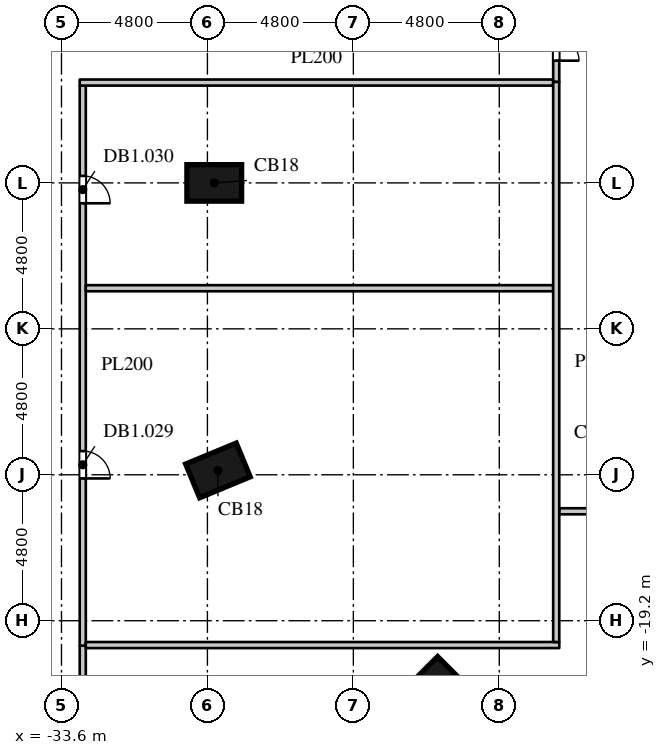
"""IFC4 building model, lengths in metres.
Left out: names, types, materials, properties, quantities, classifications, styles, units other than length and angle.
Written with IfcOpenShell. Run it as: python <this file> out.ifc"""

import sys

from ifc_helpers import new_model, si_unit, direction, frame, frame_2d, origin, origin_2d, place, context, subcontext, project, spatial, rectangle, extrude, element, fill, save


model = new_model("IFC4")
c1 = context("Model", 3, precision=1e-05, world=origin(), true_north=direction((0.0, 1.0)))
c2 = subcontext(c1, "Body", "Model", "MODEL_VIEW")
j1 = project(units=[si_unit("LENGTHUNIT", "METRE"), si_unit("PLANEANGLEUNIT", "RADIAN")], contexts=[c1])
p1 = place(None, origin())
s1 = spatial("IfcSite", under=j1, at=p1, CompositionType="ELEMENT")
p2 = place(p1, origin())
s2 = spatial("IfcBuilding", under=s1, at=p2, CompositionType="ELEMENT")
p3 = place(p2, frame((0.0, 0.0, -4.5)))
s3 = spatial("IfcBuildingStorey", under=s2, at=p3, CompositionType="ELEMENT", Elevation=-4.5)
for number, where, z_axis, x_axis in (
    (1, (-21.441, -21.441, 0.0), (0.0, 0.0, 1.0), (0.707, -0.707, 0.0)),
    (2, (-28.454, -14.257, 0.0), (0.0, 0.0, 1.0), (0.383, -0.924, 0.0)),
    (3, (-28.575, -4.8, 0.0), (0.0, 0.0, 1.0), (0.0, -1.0, 0.0)),
):
    element("IfcColumn", number, at=place(p3, frame(where, z_axis=z_axis, x_axis=x_axis)), inside=s3, PredefinedType="COLUMN", context=c2, shape_type="SweptSolid", body=[
        extrude(rectangle(XDim=1.2, YDim=1.8, at=origin_2d()), origin(), (0.0, 0.0, 1.0), 4.5),
    ])
p4 = place(p3, frame((-32.9, -32.8, 0.0), z_axis=(0.0, 0.0, 1.0), x_axis=(0.0, 1.0, 0.0)))
e4 = element("IfcWall", 4, at=p4, inside=s3, PredefinedType="PARTITIONING", context=c2, shape_type="SweptSolid", body=[
    extrude(rectangle(XDim=12.78, YDim=0.2, at=frame_2d((6.39, 0.0))), origin(), (0.0, 0.0, 1.0), 4.048),
])
p5 = place(p3, frame((-17.228, -15.6, 0.0), z_axis=(0.0, 0.0, 1.0), x_axis=(1.0, 0.0, 0.0)))
e5 = element("IfcWall", 5, at=p5, inside=s3, PredefinedType="PARTITIONING", context=c2, shape_type="SweptSolid", body=[
    extrude(rectangle(XDim=34.656, YDim=0.2, at=frame_2d((17.328, 0.0))), origin(), (0.0, 0.0, 1.0), 4.048),
])
p6 = place(p5, frame((16.5, 0.0, 0.0)))
e6 = element("IfcOpeningElement", 6, at=p6, cuts=e5, PredefinedType="OPENING", context=c2, shape_type="SweptSolid", body=[
    extrude(rectangle(XDim=1.5, YDim=2.2, at=frame_2d((0.75, 1.1))), frame((0.0, 0.11, 0.0), z_axis=(0.0, -1.0, 0.0), x_axis=(1.0, 0.0, 0.0)), (0.0, 0.0, 1.0), 0.22),
])
p7 = place(p5, frame((32.85, 0.0, 0.0)))
e7 = element("IfcOpeningElement", 7, at=p7, cuts=e5, PredefinedType="OPENING", context=c2, shape_type="SweptSolid", body=[
    extrude(rectangle(XDim=1.5, YDim=2.2, at=frame_2d((0.75, 1.1))), frame((0.0, 0.11, 0.0), z_axis=(0.0, -1.0, 0.0), x_axis=(1.0, 0.0, 0.0)), (0.0, 0.0, 1.0), 0.22),
])
p8 = place(p5, frame((14.85, 0.0, 0.0)))
e8 = element("IfcOpeningElement", 8, at=p8, cuts=e5, PredefinedType="OPENING", context=c2, shape_type="SweptSolid", body=[
    extrude(rectangle(XDim=1.5, YDim=2.2, at=frame_2d((0.75, 1.1))), frame((0.0, 0.11, 0.0), z_axis=(0.0, -1.0, 0.0), x_axis=(1.0, 0.0, 0.0)), (0.0, 0.0, 1.0), 0.22),
])
p9 = place(p5, frame((4.5, 0.0, 0.0)))
e9 = element("IfcOpeningElement", 9, at=p9, cuts=e5, PredefinedType="OPENING", context=c2, shape_type="SweptSolid", body=[
    extrude(rectangle(XDim=1.5, YDim=2.2, at=frame_2d((0.75, 1.1))), frame((0.0, 0.11, 0.0), z_axis=(0.0, -1.0, 0.0), x_axis=(1.0, 0.0, 0.0)), (0.0, 0.0, 1.0), 0.22),
])
p10 = place(p5, frame((28.5, 0.0, 0.0)))
e10 = element("IfcOpeningElement", 10, at=p10, cuts=e5, PredefinedType="OPENING", context=c2, shape_type="SweptSolid", body=[
    extrude(rectangle(XDim=1.5, YDim=2.2, at=frame_2d((0.75, 1.1))), frame((0.0, 0.11, 0.0), z_axis=(0.0, -1.0, 0.0), x_axis=(1.0, 0.0, 0.0)), (0.0, 0.0, 1.0), 0.22),
])
p11 = place(p3, frame((-17.328, -1.48, 0.0), z_axis=(0.0, 0.0, 1.0), x_axis=(0.0, 1.0, 0.0)))
e11 = element("IfcWall", 11, at=p11, inside=s3, PredefinedType="PARTITIONING", context=c2, shape_type="SweptSolid", body=[
    extrude(rectangle(XDim=2.96, YDim=0.2, at=frame_2d((1.48, 0.0))), origin(), (0.0, 0.0, 1.0), 4.048),
])
p12 = place(p11, frame((0.7, 0.0, 0.0)))
e12 = element("IfcOpeningElement", 12, at=p12, cuts=e11, PredefinedType="OPENING", context=c2, shape_type="SweptSolid", body=[
    extrude(rectangle(XDim=1.5, YDim=2.4, at=frame_2d((0.75, 1.2))), frame((0.0, 0.11, 0.0), z_axis=(0.0, -1.0, 0.0), x_axis=(1.0, 0.0, 0.0)), (0.0, 0.0, 1.0), 0.22),
])
p13 = place(p3, frame((-32.9, -20.02, 0.0), z_axis=(0.0, 0.0, 1.0), x_axis=(0.0, 1.0, 0.0)))
e13 = element("IfcWall", 13, at=p13, inside=s3, PredefinedType="PARTITIONING", context=c2, shape_type="SweptSolid", body=[
    extrude(rectangle(XDim=18.42, YDim=0.2, at=frame_2d((9.21, 0.0))), origin(), (0.0, 0.0, 1.0), 4.048),
])
p14 = place(p13, frame((5.5, 0.0, 0.0)))
e14 = element("IfcOpeningElement", 14, at=p14, cuts=e13, PredefinedType="OPENING", context=c2, shape_type="SweptSolid", body=[
    extrude(rectangle(XDim=0.9, YDim=2.2, at=frame_2d((0.45, 1.1))), frame((0.0, 0.11, 0.0), z_axis=(0.0, -1.0, 0.0), x_axis=(1.0, 0.0, 0.0)), (0.0, 0.0, 1.0), 0.22),
])
p15 = place(p13, frame((14.55, 0.0, 0.0)))
e15 = element("IfcOpeningElement", 15, at=p15, cuts=e13, PredefinedType="OPENING", context=c2, shape_type="SweptSolid", body=[
    extrude(rectangle(XDim=0.9, YDim=2.2, at=frame_2d((0.45, 1.1))), frame((0.0, 0.11, 0.0), z_axis=(0.0, -1.0, 0.0), x_axis=(1.0, 0.0, 0.0)), (0.0, 0.0, 1.0), 0.22),
])
p16 = place(p3, frame((-32.8, -20.0, 0.0), z_axis=(0.0, 0.0, 1.0), x_axis=(1.0, 0.0, 0.0)))
e16 = element("IfcWall", 16, at=p16, inside=s3, PredefinedType="PARTITIONING", context=c2, shape_type="SweptSolid", body=[
    extrude(rectangle(XDim=15.572, YDim=0.2, at=frame_2d((7.786, 0.0))), origin(), (0.0, 0.0, 1.0), 4.048),
])
p17 = place(p3, frame((-32.8, -8.264, 0.0), z_axis=(0.0, 0.0, 1.0), x_axis=(1.0, 0.0, 0.0)))
e17 = element("IfcWall", 17, at=p17, inside=s3, PredefinedType="PARTITIONING", context=c2, shape_type="SweptSolid", body=[
    extrude(rectangle(XDim=15.372, YDim=0.2, at=frame_2d((7.686, 0.0))), origin(), (0.0, 0.0, 1.0), 4.048),
])
p18 = place(p3, frame((-33.0, -1.5, 0.0), z_axis=(0.0, 0.0, 1.0), x_axis=(1.0, 0.0, 0.0)))
e18 = element("IfcWall", 18, at=p18, inside=s3, PredefinedType="PARTITIONING", context=c2, shape_type="SweptSolid", body=[
    extrude(rectangle(XDim=15.572, YDim=0.2, at=frame_2d((7.786, 0.0))), origin(), (0.0, 0.0, 1.0), 4.048),
])
p19 = place(p3, frame((-17.328, -19.9, 0.0), z_axis=(0.0, 0.0, 1.0), x_axis=(0.0, 1.0, 0.0)))
e19 = element("IfcWall", 19, at=p19, inside=s3, PredefinedType="PARTITIONING", context=c2, shape_type="SweptSolid", body=[
    extrude(rectangle(XDim=18.42, YDim=0.2, at=frame_2d((9.21, 0.0))), origin(), (0.0, 0.0, 1.0), 4.048),
])
p20 = place(p12, origin())
e20 = element("IfcDoor", 20, at=p20, inside=s3, OperationType="DOUBLE_DOOR_SINGLE_SWING", PredefinedType="DOOR", context=c2, shape_type="SweptSolid", body=[
    extrude(rectangle(XDim=1.5, YDim=2.4, at=frame_2d((0.75, 1.2))), frame((0.0, 0.025, 0.0), z_axis=(0.0, -1.0, 0.0), x_axis=(1.0, 0.0, 0.0)), (0.0, 0.0, 1.0), 0.05),
])
fill(e12, e20)
p21 = place(p14, origin())
e21 = element("IfcDoor", 21, at=p21, inside=s3, OperationType="SINGLE_SWING_RIGHT", PredefinedType="DOOR", context=c2, shape_type="SweptSolid", body=[
    extrude(rectangle(XDim=0.9, YDim=2.2, at=frame_2d((0.45, 1.1))), frame((0.0, 0.025, 0.0), z_axis=(0.0, -1.0, 0.0), x_axis=(1.0, 0.0, 0.0)), (0.0, 0.0, 1.0), 0.05),
])
fill(e14, e21)
p22 = place(p15, origin())
e22 = element("IfcDoor", 22, at=p22, inside=s3, OperationType="SINGLE_SWING_RIGHT", PredefinedType="DOOR", context=c2, shape_type="SweptSolid", body=[
    extrude(rectangle(XDim=0.9, YDim=2.2, at=frame_2d((0.45, 1.1))), frame((0.0, 0.025, 0.0), z_axis=(0.0, -1.0, 0.0), x_axis=(1.0, 0.0, 0.0)), (0.0, 0.0, 1.0), 0.05),
])
fill(e15, e22)
save(model, sys.argv[1])
